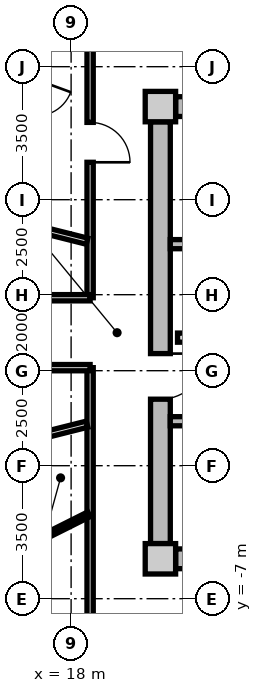
"""IFC4 building model, lengths in metres.
Left out: names, types, materials, properties, quantities, classifications, styles, units other than length and angle.
Written with IfcOpenShell. Run it as: python <this file> out.ifc"""

import sys

from ifc_helpers import new_model, si_unit, direction, frame, frame_2d, origin, origin_2d, place, context, subcontext, project, spatial, rectangle, extrude, source, transform, mapped, element, fill, save


model = new_model("IFC4")
c1 = context("Model", 3, precision=1e-05, world=origin(), true_north=direction((0.0, 1.0)))
c2 = subcontext(c1, "Body", "Model", "MODEL_VIEW")
j1 = project(units=[si_unit("LENGTHUNIT", "METRE"), si_unit("PLANEANGLEUNIT", "RADIAN")], contexts=[c1])
p1 = place(None, origin())
s1 = spatial("IfcSite", under=j1, at=p1, CompositionType="ELEMENT")
p2 = place(p1, origin())
s2 = spatial("IfcBuilding", under=s1, at=p2, CompositionType="ELEMENT")
p3 = place(p2, frame((0.0, 0.0, 216.95)))
s3 = spatial("IfcBuildingStorey", under=s2, at=p3, CompositionType="ELEMENT", Elevation=216.95)
m1 = source(origin(), c2, "Body", "SweptSolid", [
    extrude(rectangle(XDim=0.8, YDim=0.8, at=origin_2d()), origin(), (0.0, 0.0, 1.0), 3.05),
])
for number, where, z_axis, x_axis in (
    (1, (20.35, -5.95, 0.0), (0.0, 0.0, 1.0), (1.0, 0.0, 0.0)),
    (2, (20.35, 5.95, 0.0), (0.0, 0.0, 1.0), (1.0, 0.0, 0.0)),
):
    element("IfcColumn", number, at=place(p3, frame(where, z_axis=z_axis, x_axis=x_axis)), inside=s3, PredefinedType="COLUMN", context=c2, shape_type="MappedRepresentation", body=[
        mapped(m1, transform((0.0, 0.0, 0.0), x_axis=(1.0, 0.0, 0.0), y_axis=(0.0, 1.0, 0.0), z_axis=(0.0, 0.0, 1.0), scale=1.0)),
    ])
m2 = source(origin(), c2, "Body", "SweptSolid", [
    extrude(rectangle(XDim=14.5, YDim=0.52, at=frame_2d((7.25, 0.0))), origin(), (0.0, 0.0, 1.0), 2.76),
])
for number, where, z_axis, x_axis in (
    (3, (20.75, 5.95, 0.0), (0.0, 0.0, 1.0), (1.0, 0.0, 0.0)),
    (4, (35.25, -5.95, 0.0), (0.0, 0.0, 1.0), (-1.0, 0.0, 0.0)),
):
    element("IfcWall", number, at=place(p3, frame(where, z_axis=z_axis, x_axis=x_axis)), inside=s3, PredefinedType="SHEAR", context=c2, shape_type="MappedRepresentation", body=[
        mapped(m2, transform((0.0, 0.0, 0.0), x_axis=(1.0, 0.0, 0.0), y_axis=(0.0, 1.0, 0.0), z_axis=(0.0, 0.0, 1.0), scale=1.0)),
    ])
m3 = source(origin(), c2, "Body", "SweptSolid", [
    extrude(rectangle(XDim=11.1, YDim=0.52, at=frame_2d((5.55, 0.0))), origin(), (0.0, 0.0, 1.0), 2.76),
])
p4 = place(p3, frame((20.35, -5.55, 0.0), z_axis=(0.0, 0.0, 1.0), x_axis=(0.0, 1.0, 0.0)))
e5 = element("IfcWall", 5, at=p4, inside=s3, PredefinedType="SHEAR", context=c2, shape_type="MappedRepresentation", body=[
    mapped(m3, transform((0.0, 0.0, 0.0), x_axis=(1.0, 0.0, 0.0), y_axis=(0.0, 1.0, 0.0), z_axis=(0.0, 0.0, 1.0), scale=1.0)),
])
p5 = place(p4, frame((3.8, 0.0, 0.0)))
e6 = element("IfcOpeningElement", 6, at=p5, cuts=e5, PredefinedType="OPENING", context=c2, shape_type="SweptSolid", body=[
    extrude(rectangle(XDim=1.2, YDim=2.15, at=frame_2d((0.6, 1.075))), frame((0.0, 0.27, 0.0), z_axis=(0.0, -1.0, 0.0), x_axis=(1.0, 0.0, 0.0)), (0.0, 0.0, 1.0), 0.54),
])
m4 = source(origin(), c2, "Body", "SweptSolid", [
    extrude(rectangle(XDim=7.93, YDim=0.24, at=frame_2d((3.965, 0.0))), origin(), (0.0, 0.0, 1.0), 2.76),
])
p6 = place(p3, frame((20.61, 2.33, 0.0), z_axis=(0.0, 0.0, 1.0), x_axis=(1.0, 0.0, 0.0)))
e7 = element("IfcWall", 7, at=p6, inside=s3, PredefinedType="PARTITIONING", context=c2, shape_type="MappedRepresentation", body=[
    mapped(m4, transform((0.0, 0.0, 0.0), x_axis=(1.0, 0.0, 0.0), y_axis=(0.0, 1.0, 0.0), z_axis=(0.0, 0.0, 1.0), scale=1.0)),
])
p7 = place(p3, frame((20.61, -2.33, 0.0), z_axis=(0.0, 0.0, 1.0), x_axis=(1.0, 0.0, 0.0)))
e8 = element("IfcWall", 8, at=p7, inside=s3, PredefinedType="PARTITIONING", context=c2, shape_type="MappedRepresentation", body=[
    mapped(m4, transform((0.0, 0.0, 0.0), x_axis=(1.0, 0.0, 0.0), y_axis=(0.0, 1.0, 0.0), z_axis=(0.0, 0.0, 1.0), scale=1.0)),
])
p8 = place(p7, frame((1.05, 0.0, 0.0)))
e9 = element("IfcOpeningElement", 9, at=p8, cuts=e8, PredefinedType="OPENING", context=c2, shape_type="SweptSolid", body=[
    extrude(rectangle(XDim=1.1, YDim=2.15, at=frame_2d((0.55, 1.075))), frame((0.0, 0.13, 0.0), z_axis=(0.0, -1.0, 0.0), x_axis=(1.0, 0.0, 0.0)), (0.0, 0.0, 1.0), 0.26),
])
m5 = source(origin(), c2, "Body", "SweptSolid", [
    extrude(rectangle(XDim=7.62, YDim=0.24, at=frame_2d((3.81, 0.0))), origin(), (0.0, 0.0, 1.0), 2.745),
])
p9 = place(p3, frame((20.8, -0.13, 0.0), z_axis=(0.0, 0.0, 1.0), x_axis=(1.0, 0.0, 0.0)))
e10 = element("IfcWall", 10, at=p9, inside=s3, PredefinedType="PARTITIONING", context=c2, shape_type="MappedRepresentation", body=[
    mapped(m5, transform((0.0, 0.0, 0.0), x_axis=(1.0, 0.0, 0.0), y_axis=(0.0, 1.0, 0.0), z_axis=(0.0, 0.0, 1.0), scale=1.0)),
])
p10 = place(p9, frame((6.22, 0.0, 0.0)))
e11 = element("IfcOpeningElement", 11, at=p10, cuts=e10, PredefinedType="OPENING", context=c2, shape_type="SweptSolid", body=[
    extrude(rectangle(XDim=1.0, YDim=2.1, at=frame_2d((0.5, 1.05))), frame((0.0, 0.13, 0.0), z_axis=(0.0, -1.0, 0.0), x_axis=(1.0, 0.0, 0.0)), (0.0, 0.0, 1.0), 0.26),
])
p11 = place(p9, frame((2.4, 0.0, 0.0)))
e12 = element("IfcOpeningElement", 12, at=p11, cuts=e10, PredefinedType="OPENING", context=c2, shape_type="SweptSolid", body=[
    extrude(rectangle(XDim=1.0, YDim=2.1, at=frame_2d((0.5, 1.05))), frame((0.0, 0.13, 0.0), z_axis=(0.0, -1.0, 0.0), x_axis=(1.0, 0.0, 0.0)), (0.0, 0.0, 1.0), 0.26),
])
m6 = source(origin(), c2, "Body", "SweptSolid", [
    extrude(rectangle(XDim=6.88, YDim=0.165, at=frame_2d((3.44, 0.0))), origin(), (0.0, 0.0, 1.0), 2.745),
])
p12 = place(p3, frame((18.5, -7.8, 0.0), z_axis=(0.0, 0.0, 1.0), x_axis=(0.0, 1.0, 0.0)))
e13 = element("IfcWall", 13, at=p12, inside=s3, PredefinedType="PARTITIONING", context=c2, shape_type="MappedRepresentation", body=[
    mapped(m6, transform((0.0, 0.0, 0.0), x_axis=(1.0, 0.0, 0.0), y_axis=(0.0, 1.0, 0.0), z_axis=(0.0, 0.0, 1.0), scale=1.0)),
])
p13 = place(p3, frame((18.5, 0.92, 0.0), z_axis=(0.0, 0.0, 1.0), x_axis=(0.0, 1.0, 0.0)))
e14 = element("IfcWall", 14, at=p13, inside=s3, PredefinedType="PARTITIONING", context=c2, shape_type="MappedRepresentation", body=[
    mapped(m6, transform((0.0, 0.0, 0.0), x_axis=(1.0, 0.0, 0.0), y_axis=(0.0, 1.0, 0.0), z_axis=(0.0, 0.0, 1.0), scale=1.0)),
])
p14 = place(p13, frame((3.564, 0.0, 0.0)))
e15 = element("IfcOpeningElement", 15, at=p14, cuts=e14, PredefinedType="OPENING", context=c2, shape_type="SweptSolid", body=[
    extrude(rectangle(XDim=1.05, YDim=2.15, at=frame_2d((0.525, 1.075))), frame((0.0, 0.093, 0.0), z_axis=(0.0, -1.0, 0.0), x_axis=(1.0, 0.0, 0.0)), (0.0, 0.0, 1.0), 0.185),
])
m7 = source(origin(), c2, "Body", "SweptSolid", [
    extrude(rectangle(XDim=6.157, YDim=0.165, at=frame_2d((3.079, 0.0))), origin(), (0.0, 0.0, 1.0), 2.345),
])
for number, where, z_axis, x_axis in (
    (16, (18.42, 2.407, 0.0), (0.0, 0.0, 1.0), (-0.97, 0.244, 0.0)),
    (17, (18.42, -2.407, 0.0), (0.0, 0.0, 1.0), (-0.97, -0.244, 0.0)),
):
    element("IfcWall", number, at=place(p3, frame(where, z_axis=z_axis, x_axis=x_axis)), inside=s3, PredefinedType="PARTITIONING", context=c2, shape_type="MappedRepresentation", body=[
        mapped(m7, transform((0.0, 0.0, 0.0), x_axis=(1.0, 0.0, 0.0), y_axis=(0.0, 1.0, 0.0), z_axis=(0.0, 0.0, 1.0), scale=1.0)),
    ])
m8 = source(origin(), c2, "Body", "SweptSolid", [
    extrude(rectangle(XDim=6.69, YDim=0.115, at=frame_2d((3.345, 0.0))), origin(), (0.0, 0.0, 1.0), 2.745),
])
p15 = place(p3, frame((18.083, 9.352, 0.0), z_axis=(0.0, 0.0, 1.0), x_axis=(-0.343693784919, -0.939081776102, 0.0)))
e18 = element("IfcWall", 18, at=p15, inside=s3, PredefinedType="PARTITIONING", context=c2, shape_type="MappedRepresentation", body=[
    mapped(m8, transform((0.0, 0.0, 0.0), x_axis=(1.0, 0.0, 0.0), y_axis=(0.0, 1.0, 0.0), z_axis=(0.0, 0.0, 1.0), scale=1.0)),
])
p16 = place(p15, frame((2.87, 0.0, 0.0)))
e19 = element("IfcOpeningElement", 19, at=p16, cuts=e18, PredefinedType="OPENING", context=c2, shape_type="SweptSolid", body=[
    extrude(rectangle(XDim=0.95, YDim=2.1, at=frame_2d((0.475, 1.05))), frame((0.0, 0.067, 0.0), z_axis=(0.0, -1.0, 0.0), x_axis=(1.0, 0.0, 0.0)), (0.0, 0.0, 1.0), 0.135),
])
m9 = source(origin(), c2, "Body", "SweptSolid", [
    extrude(rectangle(XDim=1.638, YDim=0.14, at=frame_2d((0.819, 0.0))), origin(), (0.0, 0.0, 1.0), 2.745),
])
p17 = place(p3, frame((18.47, -4.778, 0.0), z_axis=(0.0, 0.0, 1.0), x_axis=(-0.893919977945, -0.448226586707, 0.0)))
e20 = element("IfcWall", 20, at=p17, inside=s3, PredefinedType="PARTITIONING", context=c2, shape_type="MappedRepresentation", body=[
    mapped(m9, transform((0.0, 0.0, 0.0), x_axis=(1.0, 0.0, 0.0), y_axis=(0.0, 1.0, 0.0), z_axis=(0.0, 0.0, 1.0), scale=1.0)),
])
m10 = source(origin(), c2, "Body", "SweptSolid", [
    extrude(rectangle(XDim=3.493, YDim=0.115, at=frame_2d((1.746, 0.0))), origin(), (0.0, 0.0, 1.0), 2.745),
])
p18 = place(p3, frame((16.318, -6.36, 0.0), z_axis=(0.0, 0.0, 1.0), x_axis=(0.487896553961, -0.872901456427, 0.0)))
e21 = element("IfcWall", 21, at=p18, inside=s3, PredefinedType="PARTITIONING", context=c2, shape_type="MappedRepresentation", body=[
    mapped(m10, transform((0.0, 0.0, 0.0), x_axis=(1.0, 0.0, 0.0), y_axis=(0.0, 1.0, 0.0), z_axis=(0.0, 0.0, 1.0), scale=1.0)),
])
p19 = place(p18, frame((1.271, 0.0, 0.0)))
e22 = element("IfcOpeningElement", 22, at=p19, cuts=e21, PredefinedType="OPENING", context=c2, shape_type="SweptSolid", body=[
    extrude(rectangle(XDim=0.95, YDim=2.1, at=frame_2d((0.475, 1.05))), frame((0.0, 0.067, 0.0), z_axis=(0.0, -1.0, 0.0), x_axis=(1.0, 0.0, 0.0)), (0.0, 0.0, 1.0), 0.135),
])
m11 = source(origin(), c2, "Body", "SweptSolid", [
    extrude(rectangle(XDim=37.0, YDim=0.165, at=frame_2d((18.5, 0.0))), origin(), (0.0, 0.0, 1.0), 2.745),
])
p20 = place(p3, frame((-18.5, -0.92, 0.0), z_axis=(0.0, 0.0, 1.0), x_axis=(1.0, 0.0, 0.0)))
e23 = element("IfcWall", 23, at=p20, inside=s3, PredefinedType="PARTITIONING", context=c2, shape_type="MappedRepresentation", body=[
    mapped(m11, transform((0.0, 0.0, 0.0), x_axis=(1.0, 0.0, 0.0), y_axis=(0.0, 1.0, 0.0), z_axis=(0.0, 0.0, 1.0), scale=1.0)),
])
p21 = place(p20, frame((2.662, 0.0, 0.0)))
e24 = element("IfcOpeningElement", 24, at=p21, cuts=e23, PredefinedType="OPENING", context=c2, shape_type="SweptSolid", body=[
    extrude(rectangle(XDim=0.95, YDim=2.1, at=frame_2d((0.475, 1.05))), frame((0.0, 0.093, 0.0), z_axis=(0.0, -1.0, 0.0), x_axis=(1.0, 0.0, 0.0)), (0.0, 0.0, 1.0), 0.185),
])
p22 = place(p20, frame((33.388, 0.0, 0.0)))
e25 = element("IfcOpeningElement", 25, at=p22, cuts=e23, PredefinedType="OPENING", context=c2, shape_type="SweptSolid", body=[
    extrude(rectangle(XDim=0.95, YDim=2.1, at=frame_2d((0.475, 1.05))), frame((0.0, 0.093, 0.0), z_axis=(0.0, -1.0, 0.0), x_axis=(1.0, 0.0, 0.0)), (0.0, 0.0, 1.0), 0.185),
])
p23 = place(p20, frame((9.075, 0.0, 0.0)))
e26 = element("IfcOpeningElement", 26, at=p23, cuts=e23, PredefinedType="OPENING", context=c2, shape_type="SweptSolid", body=[
    extrude(rectangle(XDim=1.25, YDim=2.2, at=frame_2d((0.625, 1.1))), frame((0.0, 0.093, 0.0), z_axis=(0.0, -1.0, 0.0), x_axis=(1.0, 0.0, 0.0)), (0.0, 0.0, 1.0), 0.185),
])
p24 = place(p20, frame((14.875, 0.0, 0.0)))
e27 = element("IfcOpeningElement", 27, at=p24, cuts=e23, PredefinedType="OPENING", context=c2, shape_type="SweptSolid", body=[
    extrude(rectangle(XDim=1.25, YDim=2.2, at=frame_2d((0.625, 1.1))), frame((0.0, 0.093, 0.0), z_axis=(0.0, -1.0, 0.0), x_axis=(1.0, 0.0, 0.0)), (0.0, 0.0, 1.0), 0.185),
])
p25 = place(p20, frame((23.03, 0.0, 0.0)))
e28 = element("IfcOpeningElement", 28, at=p25, cuts=e23, PredefinedType="OPENING", context=c2, shape_type="SweptSolid", body=[
    extrude(rectangle(XDim=1.25, YDim=2.2, at=frame_2d((0.625, 1.1))), frame((0.0, 0.093, 0.0), z_axis=(0.0, -1.0, 0.0), x_axis=(1.0, 0.0, 0.0)), (0.0, 0.0, 1.0), 0.185),
])
p26 = place(p3, frame((-18.5, 0.92, 0.0), z_axis=(0.0, 0.0, 1.0), x_axis=(1.0, 0.0, 0.0)))
e29 = element("IfcWall", 29, at=p26, inside=s3, PredefinedType="PARTITIONING", context=c2, shape_type="MappedRepresentation", body=[
    mapped(m11, transform((0.0, 0.0, 0.0), x_axis=(1.0, 0.0, 0.0), y_axis=(0.0, 1.0, 0.0), z_axis=(0.0, 0.0, 1.0), scale=1.0)),
])
p27 = place(p26, frame((2.662, 0.0, 0.0)))
e30 = element("IfcOpeningElement", 30, at=p27, cuts=e29, PredefinedType="OPENING", context=c2, shape_type="SweptSolid", body=[
    extrude(rectangle(XDim=0.95, YDim=2.1, at=frame_2d((0.475, 1.05))), frame((0.0, 0.093, 0.0), z_axis=(0.0, -1.0, 0.0), x_axis=(1.0, 0.0, 0.0)), (0.0, 0.0, 1.0), 0.185),
])
p28 = place(p26, frame((33.388, 0.0, 0.0)))
e31 = element("IfcOpeningElement", 31, at=p28, cuts=e29, PredefinedType="OPENING", context=c2, shape_type="SweptSolid", body=[
    extrude(rectangle(XDim=0.95, YDim=2.1, at=frame_2d((0.475, 1.05))), frame((0.0, 0.093, 0.0), z_axis=(0.0, -1.0, 0.0), x_axis=(1.0, 0.0, 0.0)), (0.0, 0.0, 1.0), 0.185),
])
p29 = place(p26, frame((7.64, 0.0, 0.0)))
e32 = element("IfcOpeningElement", 32, at=p29, cuts=e29, PredefinedType="OPENING", context=c2, shape_type="SweptSolid", body=[
    extrude(rectangle(XDim=0.92, YDim=2.1, at=frame_2d((0.46, 1.05))), frame((0.0, 0.093, 0.0), z_axis=(0.0, -1.0, 0.0), x_axis=(1.0, 0.0, 0.0)), (0.0, 0.0, 1.0), 0.185),
])
p30 = place(p26, frame((10.275, 0.0, 0.0)))
e33 = element("IfcOpeningElement", 33, at=p30, cuts=e29, PredefinedType="OPENING", context=c2, shape_type="SweptSolid", body=[
    extrude(rectangle(XDim=1.25, YDim=2.2, at=frame_2d((0.625, 1.1))), frame((0.0, 0.093, 0.0), z_axis=(0.0, -1.0, 0.0), x_axis=(1.0, 0.0, 0.0)), (0.0, 0.0, 1.0), 0.185),
])
p31 = place(p26, frame((14.875, 0.0, 0.0)))
e34 = element("IfcOpeningElement", 34, at=p31, cuts=e29, PredefinedType="OPENING", context=c2, shape_type="SweptSolid", body=[
    extrude(rectangle(XDim=1.25, YDim=2.2, at=frame_2d((0.625, 1.1))), frame((0.0, 0.093, 0.0), z_axis=(0.0, -1.0, 0.0), x_axis=(1.0, 0.0, 0.0)), (0.0, 0.0, 1.0), 0.185),
])
p32 = place(p26, frame((23.03, 0.0, 0.0)))
e35 = element("IfcOpeningElement", 35, at=p32, cuts=e29, PredefinedType="OPENING", context=c2, shape_type="SweptSolid", body=[
    extrude(rectangle(XDim=1.25, YDim=2.2, at=frame_2d((0.625, 1.1))), frame((0.0, 0.093, 0.0), z_axis=(0.0, -1.0, 0.0), x_axis=(1.0, 0.0, 0.0)), (0.0, 0.0, 1.0), 0.185),
])
m12 = source(origin(), c2, "Body", "SweptSolid", [
    extrude(rectangle(XDim=1.2, YDim=2.15, at=frame_2d((0.6, 1.075))), frame((0.0, 0.025, 0.0), z_axis=(0.0, -1.0, 0.0), x_axis=(1.0, 0.0, 0.0)), (0.0, 0.0, 1.0), 0.05),
])
p33 = place(p5, frame((1.2, 0.0, 0.0), z_axis=(0.0, 0.0, 1.0), x_axis=(-1.0, 0.0, 0.0)))
e36 = element("IfcDoor", 36, at=p33, inside=s3, OperationType="SINGLE_SWING_LEFT", PredefinedType="DOOR", context=c2, shape_type="MappedRepresentation", body=[
    mapped(m12, transform((0.0, 0.0, 0.0), x_axis=(1.0, 0.0, 0.0), y_axis=(0.0, 1.0, 0.0), z_axis=(0.0, 0.0, 1.0), scale=1.0)),
])
fill(e6, e36)
m13 = source(origin(), c2, "Body", "SweptSolid", [
    extrude(rectangle(XDim=1.05, YDim=2.15, at=frame_2d((0.525, 1.075))), frame((0.0, 0.025, 0.0), z_axis=(0.0, -1.0, 0.0), x_axis=(1.0, 0.0, 0.0)), (0.0, 0.0, 1.0), 0.05),
])
p34 = place(p14, frame((1.05, 0.0, 0.0), z_axis=(0.0, 0.0, 1.0), x_axis=(-1.0, 0.0, 0.0)))
e37 = element("IfcDoor", 37, at=p34, inside=s3, OperationType="SINGLE_SWING_RIGHT", PredefinedType="DOOR", context=c2, shape_type="MappedRepresentation", body=[
    mapped(m13, transform((0.0, 0.0, 0.0), x_axis=(1.0, 0.0, 0.0), y_axis=(0.0, 1.0, 0.0), z_axis=(0.0, 0.0, 1.0), scale=1.0)),
])
fill(e15, e37)
save(model, sys.argv[1])
